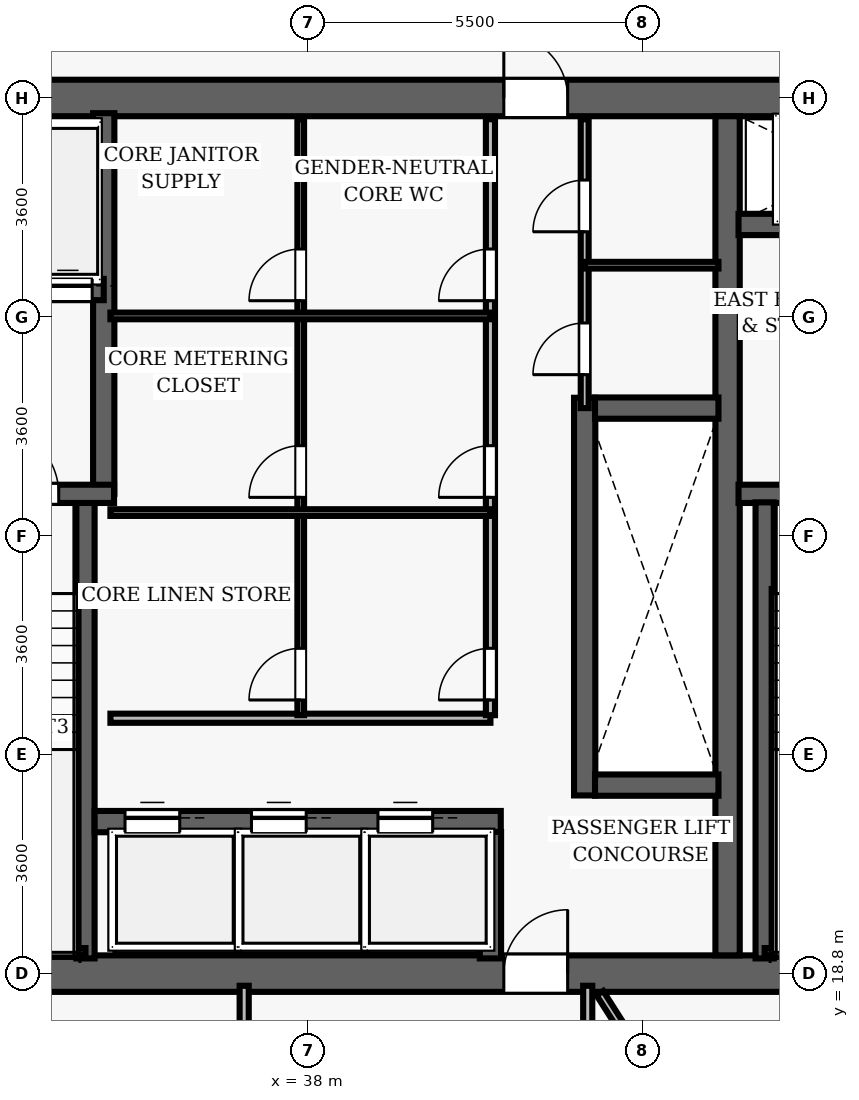
"""IFC4 building model, lengths in metres.
Left out: names, types, materials, properties, quantities, classifications, styles, units other than length and angle.
Written with IfcOpenShell. Run it as: python <this file> out.ifc"""

import sys

from ifc_helpers import new_model, si_unit, direction, frame, frame_2d, origin, place, context, subcontext, project, spatial, rectangle, extrude, element, fill, save


model = new_model("IFC4")
c1 = context("Model", 3, precision=1e-05, world=origin(), true_north=direction((0.0, 1.0)))
c2 = subcontext(c1, "Body", "Model", "MODEL_VIEW")
j1 = project(units=[si_unit("LENGTHUNIT", "METRE"), si_unit("PLANEANGLEUNIT", "RADIAN")], contexts=[c1])
p1 = place(None, origin())
s1 = spatial("IfcSite", under=j1, at=p1, CompositionType="ELEMENT")
p2 = place(p1, origin())
s2 = spatial("IfcBuilding", under=s1, at=p2, CompositionType="ELEMENT")
p3 = place(p2, frame((0.0, 0.0, 134.3)))
s3 = spatial("IfcBuildingStorey", under=s2, at=p3, CompositionType="ELEMENT", Elevation=134.3)
p4 = place(p3, frame((26.7, 18.8, 0.0), z_axis=(0.0, 0.0, 1.0), x_axis=(1.0, 0.0, 0.0)))
e1 = element("IfcWall", 1, at=p4, inside=s3, PredefinedType="SHEAR", context=c2, shape_type="SweptSolid", body=[
    extrude(rectangle(XDim=22.6, YDim=0.6, at=frame_2d((11.3, 0.0))), origin(), (0.0, 0.0, 1.0), 3.5),
])
p5 = place(p4, frame((14.52, 0.0, 0.0)))
e2 = element("IfcOpeningElement", 2, at=p5, cuts=e1, PredefinedType="OPENING", context=c2, shape_type="SweptSolid", body=[
    extrude(rectangle(XDim=1.05, YDim=2.15, at=frame_2d((0.525, 1.075))), frame((0.0, 0.31, 0.0), z_axis=(0.0, -1.0, 0.0), x_axis=(1.0, 0.0, 0.0)), (0.0, 0.0, 1.0), 0.62),
])
p6 = place(p3, frame((26.7, 33.2, 0.0), z_axis=(0.0, 0.0, 1.0), x_axis=(1.0, 0.0, 0.0)))
e3 = element("IfcWall", 3, at=p6, inside=s3, PredefinedType="SHEAR", context=c2, shape_type="SweptSolid", body=[
    extrude(rectangle(XDim=22.6, YDim=0.6, at=frame_2d((11.3, 0.0))), origin(), (0.0, 0.0, 1.0), 3.5),
])
p7 = place(p6, frame((4.62, 0.0, 0.0)))
e4 = element("IfcOpeningElement", 4, at=p7, cuts=e3, PredefinedType="OPENING", context=c2, shape_type="SweptSolid", body=[
    extrude(rectangle(XDim=1.05, YDim=2.15, at=frame_2d((0.525, 1.075))), frame((0.0, 0.31, 0.0), z_axis=(0.0, -1.0, 0.0), x_axis=(1.0, 0.0, 0.0)), (0.0, 0.0, 1.0), 0.62),
])
p8 = place(p6, frame((14.52, 0.0, 0.0)))
e5 = element("IfcOpeningElement", 5, at=p8, cuts=e3, PredefinedType="OPENING", context=c2, shape_type="SweptSolid", body=[
    extrude(rectangle(XDim=1.05, YDim=2.15, at=frame_2d((0.525, 1.075))), frame((0.0, 0.31, 0.0), z_axis=(0.0, -1.0, 0.0), x_axis=(1.0, 0.0, 0.0)), (0.0, 0.0, 1.0), 0.62),
])
p9 = place(p3, frame((44.9, 19.1, 0.0), z_axis=(0.0, 0.0, 1.0), x_axis=(0.0, 1.0, 0.0)))
e6 = element("IfcWall", 6, at=p9, inside=s3, PredefinedType="SHEAR", context=c2, shape_type="SweptSolid", body=[
    extrude(rectangle(XDim=13.8, YDim=0.4, at=frame_2d((6.9, 0.0))), origin(), (0.0, 0.0, 1.0), 3.5),
])
p10 = place(p3, frame((45.08, 26.69, 0.0), z_axis=(0.0, 0.0, 1.0), x_axis=(1.0, 0.0, 0.0)))
e7 = element("IfcWall", 7, at=p10, inside=s3, PredefinedType="SHEAR", context=c2, shape_type="SweptSolid", body=[
    extrude(rectangle(XDim=3.67, YDim=0.3, at=frame_2d((1.835, 0.0))), origin(), (0.0, 0.0, 1.0), 3.5),
])
p11 = place(p10, frame((1.05, 0.0, 0.0)))
e8 = element("IfcOpeningElement", 8, at=p11, cuts=e7, PredefinedType="OPENING", context=c2, shape_type="SweptSolid", body=[
    extrude(rectangle(XDim=1.1, YDim=2.15, at=frame_2d((0.55, 1.075))), frame((0.0, 0.16, 0.0), z_axis=(0.0, -1.0, 0.0), x_axis=(1.0, 0.0, 0.0)), (0.0, 0.0, 1.0), 0.32),
])
p12 = place(p3, frame((45.51, 19.05, 0.0), z_axis=(0.0, 0.0, 1.0), x_axis=(0.0, 1.0, 0.0)))
e9 = element("IfcWall", 9, at=p12, inside=s3, PredefinedType="SHEAR", context=c2, shape_type="SweptSolid", body=[
    extrude(rectangle(XDim=7.5, YDim=0.3, at=frame_2d((3.75, 0.0))), origin(), (0.0, 0.0, 1.0), 3.5),
])
p13 = place(p3, frame((45.51, 19.16, 0.0), z_axis=(0.0, 0.0, 1.0), x_axis=(1.0, 0.0, 0.0)))
e10 = element("IfcWall", 10, at=p13, inside=s3, PredefinedType="SHEAR", context=c2, shape_type="SweptSolid", body=[
    extrude(rectangle(XDim=3.095, YDim=0.12, at=frame_2d((1.547, 0.0))), origin(), (0.0, 0.0, 1.0), 3.5),
])
p14 = place(p3, frame((45.08, 31.12, 0.0), z_axis=(0.0, 0.0, 1.0), x_axis=(1.0, 0.0, 0.0)))
e11 = element("IfcWall", 11, at=p14, inside=s3, PredefinedType="SHEAR", context=c2, shape_type="SweptSolid", body=[
    extrude(rectangle(XDim=3.67, YDim=0.35, at=frame_2d((1.835, 0.0))), origin(), (0.0, 0.0, 1.0), 2.675),
])
p15 = place(p14, frame((1.25, 0.0, 0.0)))
e12 = element("IfcOpeningElement", 12, at=p15, cuts=e11, PredefinedType="OPENING", context=c2, shape_type="SweptSolid", body=[
    extrude(rectangle(XDim=1.1, YDim=2.15, at=frame_2d((0.55, 1.075))), frame((0.0, 0.185, 0.0), z_axis=(0.0, -1.0, 0.0), x_axis=(1.0, 0.0, 0.0)), (0.0, 0.0, 1.0), 0.37),
])
p16 = place(p3, frame((34.34, 19.05, 0.0), z_axis=(0.0, 0.0, 1.0), x_axis=(0.0, 1.0, 0.0)))
e13 = element("IfcWall", 13, at=p16, inside=s3, PredefinedType="SHEAR", context=c2, shape_type="SweptSolid", body=[
    extrude(rectangle(XDim=7.5, YDim=0.3, at=frame_2d((3.75, 0.0))), origin(), (0.0, 0.0, 1.0), 3.5),
])
p17 = place(p3, frame((34.64, 26.69, 0.0), z_axis=(0.0, 0.0, 1.0), x_axis=(0.0, 1.0, 0.0)))
e14 = element("IfcWall", 14, at=p17, inside=s3, PredefinedType="SHEAR", context=c2, shape_type="SweptSolid", body=[
    extrude(rectangle(XDim=6.26, YDim=0.35, at=frame_2d((3.13, 0.0))), origin(), (0.0, 0.0, 1.0), 3.5),
])
p18 = place(p3, frame((31.25, 26.69, 0.0), z_axis=(0.0, 0.0, 1.0), x_axis=(1.0, 0.0, 0.0)))
e15 = element("IfcWall", 15, at=p18, inside=s3, PredefinedType="SHEAR", context=c2, shape_type="SweptSolid", body=[
    extrude(rectangle(XDim=3.56, YDim=0.3, at=frame_2d((1.78, 0.0))), origin(), (0.0, 0.0, 1.0), 3.5),
])
p19 = place(p18, frame((1.55, 0.0, 0.0)))
e16 = element("IfcOpeningElement", 16, at=p19, cuts=e15, PredefinedType="OPENING", context=c2, shape_type="SweptSolid", body=[
    extrude(rectangle(XDim=1.1, YDim=2.15, at=frame_2d((0.55, 1.075))), frame((0.0, 0.16, 0.0), z_axis=(0.0, -1.0, 0.0), x_axis=(1.0, 0.0, 0.0)), (0.0, 0.0, 1.0), 0.32),
])
p20 = place(p3, frame((31.3, 19.16, 0.0), z_axis=(0.0, 0.0, 1.0), x_axis=(1.0, 0.0, 0.0)))
e17 = element("IfcWall", 17, at=p20, inside=s3, PredefinedType="SHEAR", context=c2, shape_type="SweptSolid", body=[
    extrude(rectangle(XDim=3.04, YDim=0.12, at=frame_2d((1.52, 0.0))), origin(), (0.0, 0.0, 1.0), 3.5),
])
p21 = place(p3, frame((32.23, 30.05, 0.0), z_axis=(0.0, 0.0, 1.0), x_axis=(1.0, 0.0, 0.0)))
e18 = element("IfcWall", 18, at=p21, inside=s3, PredefinedType="SHEAR", context=c2, shape_type="SweptSolid", body=[
    extrude(rectangle(XDim=2.41, YDim=0.35, at=frame_2d((1.205, 0.0))), origin(), (0.0, 0.0, 1.0), 2.675),
])
p22 = place(p21, frame((0.42, 0.0, 0.0)))
e19 = element("IfcOpeningElement", 19, at=p22, cuts=e18, PredefinedType="OPENING", context=c2, shape_type="SweptSolid", body=[
    extrude(rectangle(XDim=0.8, YDim=2.15, at=frame_2d((0.4, 1.075))), frame((0.0, 0.185, 0.0), z_axis=(0.0, -1.0, 0.0), x_axis=(1.0, 0.0, 0.0)), (0.0, 0.0, 1.0), 0.37),
])
p23 = place(p21, frame((1.42, 0.0, 0.0)))
e20 = element("IfcOpeningElement", 20, at=p23, cuts=e18, PredefinedType="OPENING", context=c2, shape_type="SweptSolid", body=[
    extrude(rectangle(XDim=0.8, YDim=2.15, at=frame_2d((0.4, 1.075))), frame((0.0, 0.185, 0.0), z_axis=(0.0, -1.0, 0.0), x_axis=(1.0, 0.0, 0.0)), (0.0, 0.0, 1.0), 0.37),
])
p24 = place(p3, frame((42.55, 21.73, 0.0), z_axis=(0.0, 0.0, 1.0), x_axis=(0.0, 1.0, 0.0)))
e21 = element("IfcWall", 21, at=p24, inside=s3, PredefinedType="SHEAR", context=c2, shape_type="SweptSolid", body=[
    extrude(rectangle(XDim=6.54, YDim=0.35, at=frame_2d((3.27, 0.0))), origin(), (0.0, 0.0, 1.0), 2.675),
])
for number, where, z_axis, x_axis in (
    (22, (42.72, 21.9, 0.0), (0.0, 0.0, 1.0), (1.0, 0.0, 0.0)),
    (23, (42.72, 28.1, 0.0), (0.0, 0.0, 1.0), (1.0, 0.0, 0.0)),
):
    element("IfcWall", number, at=place(p3, frame(where, z_axis=z_axis, x_axis=x_axis)), inside=s3, PredefinedType="SHEAR", context=c2, shape_type="SweptSolid", body=[
        extrude(rectangle(XDim=2.03, YDim=0.35, at=frame_2d((1.015, 0.0))), origin(), (0.0, 0.0, 1.0), 2.675),
    ])
p25 = place(p3, frame((34.49, 21.3, 0.0), z_axis=(0.0, 0.0, 1.0), x_axis=(1.0, 0.0, 0.0)))
e24 = element("IfcWall", 24, at=p25, inside=s3, PredefinedType="SHEAR", context=c2, shape_type="SweptSolid", body=[
    extrude(rectangle(XDim=6.68, YDim=0.35, at=frame_2d((3.34, 0.0))), origin(), (0.0, 0.0, 1.0), 2.675),
])
p26 = place(p25, frame((0.5, 0.0, 0.0)))
e25 = element("IfcOpeningElement", 25, at=p26, cuts=e24, PredefinedType="OPENING", context=c2, shape_type="SweptSolid", body=[
    extrude(rectangle(XDim=0.9, YDim=2.15, at=frame_2d((0.45, 1.075))), frame((0.0, 0.185, 0.0), z_axis=(0.0, -1.0, 0.0), x_axis=(1.0, 0.0, 0.0)), (0.0, 0.0, 1.0), 0.37),
])
p27 = place(p25, frame((2.58, 0.0, 0.0)))
e26 = element("IfcOpeningElement", 26, at=p27, cuts=e24, PredefinedType="OPENING", context=c2, shape_type="SweptSolid", body=[
    extrude(rectangle(XDim=0.9, YDim=2.15, at=frame_2d((0.45, 1.075))), frame((0.0, 0.185, 0.0), z_axis=(0.0, -1.0, 0.0), x_axis=(1.0, 0.0, 0.0)), (0.0, 0.0, 1.0), 0.37),
])
p28 = place(p25, frame((4.66, 0.0, 0.0)))
e27 = element("IfcOpeningElement", 27, at=p28, cuts=e24, PredefinedType="OPENING", context=c2, shape_type="SweptSolid", body=[
    extrude(rectangle(XDim=0.9, YDim=2.15, at=frame_2d((0.45, 1.075))), frame((0.0, 0.185, 0.0), z_axis=(0.0, -1.0, 0.0), x_axis=(1.0, 0.0, 0.0)), (0.0, 0.0, 1.0), 0.37),
])
p29 = place(p3, frame((41.0, 19.05, 0.0), z_axis=(0.0, 0.0, 1.0), x_axis=(0.0, 1.0, 0.0)))
e28 = element("IfcWall", 28, at=p29, inside=s3, PredefinedType="SHEAR", context=c2, shape_type="SweptSolid", body=[
    extrude(rectangle(XDim=2.08, YDim=0.35, at=frame_2d((1.04, 0.0))), origin(), (0.0, 0.0, 1.0), 2.675),
])
p30 = place(p3, frame((34.75, 23.0, 0.0), z_axis=(0.0, 0.0, 1.0), x_axis=(1.0, 0.0, 0.0)))
e29 = element("IfcWall", 29, at=p30, inside=s3, PredefinedType="PARTITIONING", context=c2, shape_type="SweptSolid", body=[
    extrude(rectangle(XDim=6.25, YDim=0.15, at=frame_2d((3.125, 0.0))), origin(), (0.0, 0.0, 1.0), 2.675),
])
p31 = place(p3, frame((41.0, 23.05, 0.0), z_axis=(0.0, 0.0, 1.0), x_axis=(0.0, 1.0, 0.0)))
e30 = element("IfcWall", 30, at=p31, inside=s3, PredefinedType="PARTITIONING", context=c2, shape_type="SweptSolid", body=[
    extrude(rectangle(XDim=9.8, YDim=0.15, at=frame_2d((4.9, 0.0))), origin(), (0.0, 0.0, 1.0), 2.675),
])
p32 = place(p31, frame((0.25, 0.0, 0.0)))
e31 = element("IfcOpeningElement", 31, at=p32, cuts=e30, PredefinedType="OPENING", context=c2, shape_type="SweptSolid", body=[
    extrude(rectangle(XDim=0.85, YDim=2.1, at=frame_2d((0.425, 1.05))), frame((0.0, 0.085, 0.0), z_axis=(0.0, -1.0, 0.0), x_axis=(1.0, 0.0, 0.0)), (0.0, 0.0, 1.0), 0.17),
])
p33 = place(p31, frame((3.582, 0.0, 0.0)))
e32 = element("IfcOpeningElement", 32, at=p33, cuts=e30, PredefinedType="OPENING", context=c2, shape_type="SweptSolid", body=[
    extrude(rectangle(XDim=0.85, YDim=2.1, at=frame_2d((0.425, 1.05))), frame((0.0, 0.085, 0.0), z_axis=(0.0, -1.0, 0.0), x_axis=(1.0, 0.0, 0.0)), (0.0, 0.0, 1.0), 0.17),
])
p34 = place(p31, frame((6.816, 0.0, 0.0)))
e33 = element("IfcOpeningElement", 33, at=p34, cuts=e30, PredefinedType="OPENING", context=c2, shape_type="SweptSolid", body=[
    extrude(rectangle(XDim=0.85, YDim=2.1, at=frame_2d((0.425, 1.05))), frame((0.0, 0.085, 0.0), z_axis=(0.0, -1.0, 0.0), x_axis=(1.0, 0.0, 0.0)), (0.0, 0.0, 1.0), 0.17),
])
p35 = place(p3, frame((37.88, 23.05, 0.0), z_axis=(0.0, 0.0, 1.0), x_axis=(0.0, 1.0, 0.0)))
e34 = element("IfcWall", 34, at=p35, inside=s3, PredefinedType="PARTITIONING", context=c2, shape_type="SweptSolid", body=[
    extrude(rectangle(XDim=9.8, YDim=0.11, at=frame_2d((4.9, 0.0))), origin(), (0.0, 0.0, 1.0), 2.675),
])
p36 = place(p35, frame((0.25, 0.0, 0.0)))
e35 = element("IfcOpeningElement", 35, at=p36, cuts=e34, PredefinedType="OPENING", context=c2, shape_type="SweptSolid", body=[
    extrude(rectangle(XDim=0.85, YDim=2.1, at=frame_2d((0.425, 1.05))), frame((0.0, 0.065, 0.0), z_axis=(0.0, -1.0, 0.0), x_axis=(1.0, 0.0, 0.0)), (0.0, 0.0, 1.0), 0.13),
])
p37 = place(p35, frame((3.582, 0.0, 0.0)))
e36 = element("IfcOpeningElement", 36, at=p37, cuts=e34, PredefinedType="OPENING", context=c2, shape_type="SweptSolid", body=[
    extrude(rectangle(XDim=0.85, YDim=2.1, at=frame_2d((0.425, 1.05))), frame((0.0, 0.065, 0.0), z_axis=(0.0, -1.0, 0.0), x_axis=(1.0, 0.0, 0.0)), (0.0, 0.0, 1.0), 0.13),
])
p38 = place(p35, frame((6.816, 0.0, 0.0)))
e37 = element("IfcOpeningElement", 37, at=p38, cuts=e34, PredefinedType="OPENING", context=c2, shape_type="SweptSolid", body=[
    extrude(rectangle(XDim=0.85, YDim=2.1, at=frame_2d((0.425, 1.05))), frame((0.0, 0.065, 0.0), z_axis=(0.0, -1.0, 0.0), x_axis=(1.0, 0.0, 0.0)), (0.0, 0.0, 1.0), 0.13),
])
for number, where, z_axis, x_axis in (
    (38, (34.75, 26.382, 0.0), (0.0, 0.0, 1.0), (1.0, 0.0, 0.0)),
    (39, (34.75, 29.616, 0.0), (0.0, 0.0, 1.0), (1.0, 0.0, 0.0)),
):
    element("IfcWall", number, at=place(p3, frame(where, z_axis=z_axis, x_axis=x_axis)), inside=s3, PredefinedType="PARTITIONING", context=c2, shape_type="SweptSolid", body=[
        extrude(rectangle(XDim=6.25, YDim=0.11, at=frame_2d((3.125, 0.0))), origin(), (0.0, 0.0, 1.0), 2.675),
    ])
p39 = place(p3, frame((42.55, 28.1, 0.0), z_axis=(0.0, 0.0, 1.0), x_axis=(0.0, 1.0, 0.0)))
e40 = element("IfcWall", 40, at=p39, inside=s3, PredefinedType="PARTITIONING", context=c2, shape_type="SweptSolid", body=[
    extrude(rectangle(XDim=4.75, YDim=0.13, at=frame_2d((2.375, 0.0))), origin(), (0.0, 0.0, 1.0), 2.675),
])
p40 = place(p39, frame((0.55, 0.0, 0.0)))
e41 = element("IfcOpeningElement", 41, at=p40, cuts=e40, PredefinedType="OPENING", context=c2, shape_type="SweptSolid", body=[
    extrude(rectangle(XDim=0.85, YDim=2.1, at=frame_2d((0.425, 1.05))), frame((0.0, 0.075, 0.0), z_axis=(0.0, -1.0, 0.0), x_axis=(1.0, 0.0, 0.0)), (0.0, 0.0, 1.0), 0.15),
])
p41 = place(p39, frame((2.9, 0.0, 0.0)))
e42 = element("IfcOpeningElement", 42, at=p41, cuts=e40, PredefinedType="OPENING", context=c2, shape_type="SweptSolid", body=[
    extrude(rectangle(XDim=0.85, YDim=2.1, at=frame_2d((0.425, 1.05))), frame((0.0, 0.075, 0.0), z_axis=(0.0, -1.0, 0.0), x_axis=(1.0, 0.0, 0.0)), (0.0, 0.0, 1.0), 0.15),
])
p42 = place(p3, frame((42.55, 30.45, 0.0), z_axis=(0.0, 0.0, 1.0), x_axis=(1.0, 0.0, 0.0)))
e43 = element("IfcWall", 43, at=p42, inside=s3, PredefinedType="PARTITIONING", context=c2, shape_type="SweptSolid", body=[
    extrude(rectangle(XDim=2.2, YDim=0.11, at=frame_2d((1.1, 0.0))), origin(), (0.0, 0.0, 1.0), 2.675),
])
p43 = place(p3, frame((36.95, 11.2, 0.0), z_axis=(0.0, 0.0, 1.0), x_axis=(0.0, 1.0, 0.0)))
e44 = element("IfcWall", 44, at=p43, inside=s3, PredefinedType="PARTITIONING", context=c2, shape_type="SweptSolid", body=[
    extrude(rectangle(XDim=7.4, YDim=0.15, at=frame_2d((3.7, 0.0))), origin(), (0.0, 0.0, 1.0), 2.675),
])
p44 = place(p43, frame((5.075, 0.0, 0.0)))
e45 = element("IfcOpeningElement", 45, at=p44, cuts=e44, PredefinedType="OPENING", context=c2, shape_type="SweptSolid", body=[
    extrude(rectangle(XDim=0.95, YDim=2.15, at=frame_2d((0.475, 1.075))), frame((0.0, 0.085, 0.0), z_axis=(0.0, -1.0, 0.0), x_axis=(1.0, 0.0, 0.0)), (0.0, 0.0, 1.0), 0.17),
])
p45 = place(p3, frame((42.6, 16.65, 0.0), z_axis=(0.0, 0.0, 1.0), x_axis=(0.0, 1.0, 0.0)))
e46 = element("IfcWall", 46, at=p45, inside=s3, PredefinedType="PARTITIONING", context=c2, shape_type="SweptSolid", body=[
    extrude(rectangle(XDim=1.95, YDim=0.15, at=frame_2d((0.975, 0.0))), origin(), (0.0, 0.0, 1.0), 2.675),
])
p46 = place(p3, frame((42.799, 18.48, 0.0), z_axis=(0.0, 0.0, 1.0), x_axis=(0.537959445607, -0.842970720063, 0.0)))
e47 = element("IfcWall", 47, at=p46, inside=s3, PredefinedType="PARTITIONING", context=c2, shape_type="SweptSolid", body=[
    extrude(rectangle(XDim=18.064, YDim=0.13, at=frame_2d((9.032, 0.0))), origin(), (0.0, 0.0, 1.0), 2.675),
])
p47 = place(p19, origin())
e48 = element("IfcDoor", 48, at=p47, inside=s3, OperationType="SINGLE_SWING_LEFT", PredefinedType="DOOR", context=c2, shape_type="SweptSolid", body=[
    extrude(rectangle(XDim=1.1, YDim=2.15, at=frame_2d((0.55, 1.075))), frame((0.0, 0.025, 0.0), z_axis=(0.0, -1.0, 0.0), x_axis=(1.0, 0.0, 0.0)), (0.0, 0.0, 1.0), 0.05),
])
fill(e16, e48)
p48 = place(p8, origin())
e49 = element("IfcDoor", 49, at=p48, inside=s3, OperationType="SINGLE_SWING_LEFT", PredefinedType="DOOR", context=c2, shape_type="SweptSolid", body=[
    extrude(rectangle(XDim=1.05, YDim=2.15, at=frame_2d((0.525, 1.075))), frame((0.0, 0.025, 0.0), z_axis=(0.0, -1.0, 0.0), x_axis=(1.0, 0.0, 0.0)), (0.0, 0.0, 1.0), 0.05),
])
fill(e5, e49)
p49 = place(p5, origin())
e50 = element("IfcDoor", 50, at=p49, inside=s3, OperationType="SINGLE_SWING_RIGHT", PredefinedType="DOOR", context=c2, shape_type="SweptSolid", body=[
    extrude(rectangle(XDim=1.05, YDim=2.15, at=frame_2d((0.525, 1.075))), frame((0.0, 0.025, 0.0), z_axis=(0.0, -1.0, 0.0), x_axis=(1.0, 0.0, 0.0)), (0.0, 0.0, 1.0), 0.05),
])
fill(e2, e50)
p50 = place(p32, origin())
e51 = element("IfcDoor", 51, at=p50, inside=s3, OperationType="SINGLE_SWING_LEFT", PredefinedType="DOOR", context=c2, shape_type="SweptSolid", body=[
    extrude(rectangle(XDim=0.85, YDim=2.1, at=frame_2d((0.425, 1.05))), frame((0.0, 0.025, 0.0), z_axis=(0.0, -1.0, 0.0), x_axis=(1.0, 0.0, 0.0)), (0.0, 0.0, 1.0), 0.05),
])
fill(e31, e51)
p51 = place(p36, origin())
e52 = element("IfcDoor", 52, at=p51, inside=s3, OperationType="SINGLE_SWING_LEFT", PredefinedType="DOOR", context=c2, shape_type="SweptSolid", body=[
    extrude(rectangle(XDim=0.85, YDim=2.1, at=frame_2d((0.425, 1.05))), frame((0.0, 0.025, 0.0), z_axis=(0.0, -1.0, 0.0), x_axis=(1.0, 0.0, 0.0)), (0.0, 0.0, 1.0), 0.05),
])
fill(e35, e52)
p52 = place(p33, origin())
e53 = element("IfcDoor", 53, at=p52, inside=s3, OperationType="SINGLE_SWING_LEFT", PredefinedType="DOOR", context=c2, shape_type="SweptSolid", body=[
    extrude(rectangle(XDim=0.85, YDim=2.1, at=frame_2d((0.425, 1.05))), frame((0.0, 0.025, 0.0), z_axis=(0.0, -1.0, 0.0), x_axis=(1.0, 0.0, 0.0)), (0.0, 0.0, 1.0), 0.05),
])
fill(e32, e53)
p53 = place(p37, origin())
e54 = element("IfcDoor", 54, at=p53, inside=s3, OperationType="SINGLE_SWING_LEFT", PredefinedType="DOOR", context=c2, shape_type="SweptSolid", body=[
    extrude(rectangle(XDim=0.85, YDim=2.1, at=frame_2d((0.425, 1.05))), frame((0.0, 0.025, 0.0), z_axis=(0.0, -1.0, 0.0), x_axis=(1.0, 0.0, 0.0)), (0.0, 0.0, 1.0), 0.05),
])
fill(e36, e54)
p54 = place(p34, origin())
e55 = element("IfcDoor", 55, at=p54, inside=s3, OperationType="SINGLE_SWING_LEFT", PredefinedType="DOOR", context=c2, shape_type="SweptSolid", body=[
    extrude(rectangle(XDim=0.85, YDim=2.1, at=frame_2d((0.425, 1.05))), frame((0.0, 0.025, 0.0), z_axis=(0.0, -1.0, 0.0), x_axis=(1.0, 0.0, 0.0)), (0.0, 0.0, 1.0), 0.05),
])
fill(e33, e55)
p55 = place(p38, origin())
e56 = element("IfcDoor", 56, at=p55, inside=s3, OperationType="SINGLE_SWING_LEFT", PredefinedType="DOOR", context=c2, shape_type="SweptSolid", body=[
    extrude(rectangle(XDim=0.85, YDim=2.1, at=frame_2d((0.425, 1.05))), frame((0.0, 0.025, 0.0), z_axis=(0.0, -1.0, 0.0), x_axis=(1.0, 0.0, 0.0)), (0.0, 0.0, 1.0), 0.05),
])
fill(e37, e56)
p56 = place(p40, origin())
e57 = element("IfcDoor", 57, at=p56, inside=s3, OperationType="SINGLE_SWING_LEFT", PredefinedType="DOOR", context=c2, shape_type="SweptSolid", body=[
    extrude(rectangle(XDim=0.85, YDim=2.1, at=frame_2d((0.425, 1.05))), frame((0.0, 0.025, 0.0), z_axis=(0.0, -1.0, 0.0), x_axis=(1.0, 0.0, 0.0)), (0.0, 0.0, 1.0), 0.05),
])
fill(e41, e57)
p57 = place(p41, origin())
e58 = element("IfcDoor", 58, at=p57, inside=s3, OperationType="SINGLE_SWING_LEFT", PredefinedType="DOOR", context=c2, shape_type="SweptSolid", body=[
    extrude(rectangle(XDim=0.85, YDim=2.1, at=frame_2d((0.425, 1.05))), frame((0.0, 0.025, 0.0), z_axis=(0.0, -1.0, 0.0), x_axis=(1.0, 0.0, 0.0)), (0.0, 0.0, 1.0), 0.05),
])
fill(e42, e58)
p58 = place(p26, origin())
e59 = element("IfcDoor", 59, at=p58, inside=s3, OperationType="SLIDING_TO_LEFT", PredefinedType="DOOR", context=c2, shape_type="SweptSolid", body=[
    extrude(rectangle(XDim=0.9, YDim=2.15, at=frame_2d((0.45, 1.075))), frame((0.0, 0.025, 0.0), z_axis=(0.0, -1.0, 0.0), x_axis=(1.0, 0.0, 0.0)), (0.0, 0.0, 1.0), 0.05),
])
fill(e25, e59)
p59 = place(p27, origin())
e60 = element("IfcDoor", 60, at=p59, inside=s3, OperationType="SLIDING_TO_LEFT", PredefinedType="DOOR", context=c2, shape_type="SweptSolid", body=[
    extrude(rectangle(XDim=0.9, YDim=2.15, at=frame_2d((0.45, 1.075))), frame((0.0, 0.025, 0.0), z_axis=(0.0, -1.0, 0.0), x_axis=(1.0, 0.0, 0.0)), (0.0, 0.0, 1.0), 0.05),
])
fill(e26, e60)
p60 = place(p28, origin())
e61 = element("IfcDoor", 61, at=p60, inside=s3, OperationType="SLIDING_TO_LEFT", PredefinedType="DOOR", context=c2, shape_type="SweptSolid", body=[
    extrude(rectangle(XDim=0.9, YDim=2.15, at=frame_2d((0.45, 1.075))), frame((0.0, 0.025, 0.0), z_axis=(0.0, -1.0, 0.0), x_axis=(1.0, 0.0, 0.0)), (0.0, 0.0, 1.0), 0.05),
])
fill(e27, e61)
p61 = place(p23, origin())
e62 = element("IfcDoor", 62, at=p61, inside=s3, OperationType="SLIDING_TO_LEFT", PredefinedType="DOOR", context=c2, shape_type="SweptSolid", body=[
    extrude(rectangle(XDim=0.8, YDim=2.15, at=frame_2d((0.4, 1.075))), frame((0.0, 0.025, 0.0), z_axis=(0.0, -1.0, 0.0), x_axis=(1.0, 0.0, 0.0)), (0.0, 0.0, 1.0), 0.05),
])
fill(e20, e62)
save(model, sys.argv[1])
